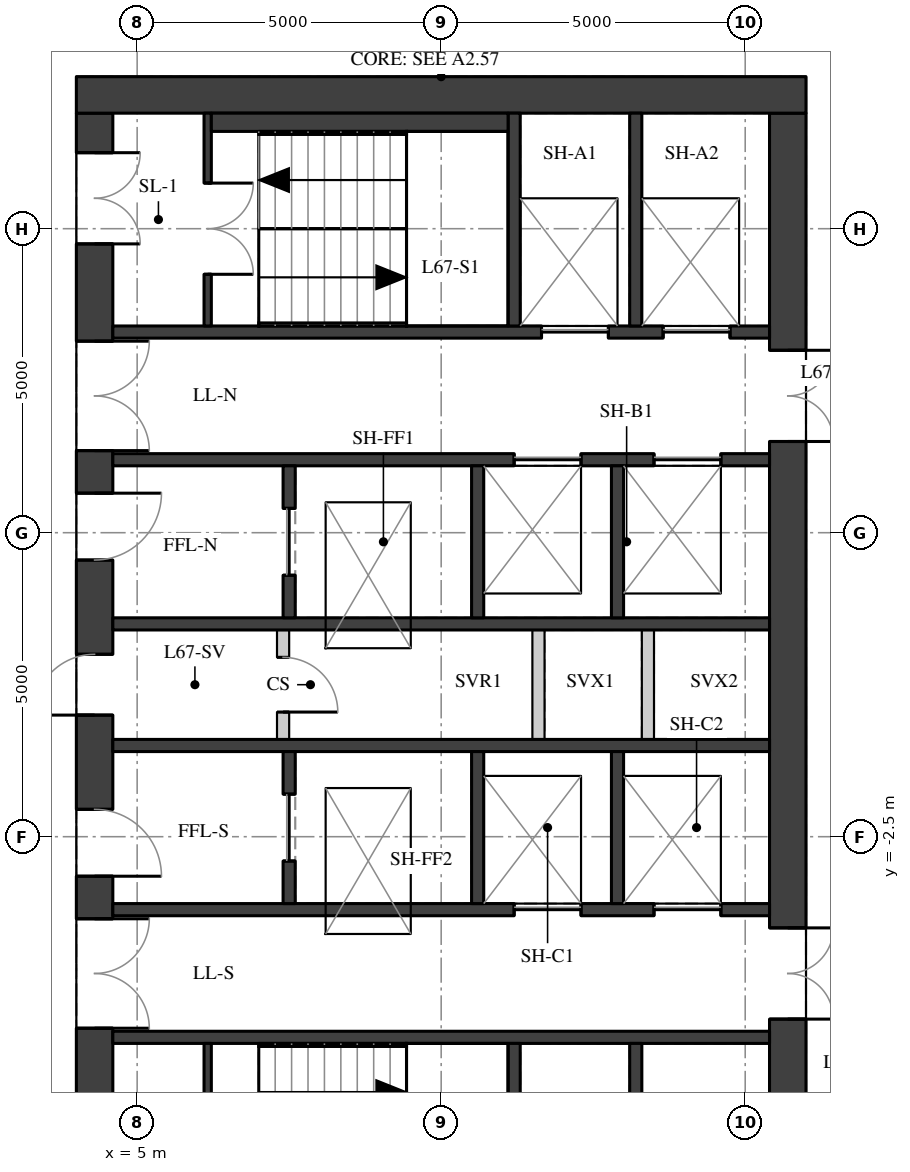
"""IFC4 building model, lengths in metres.
Left out: names, types, materials, properties, quantities, classifications, styles, units other than length and angle.
Written with IfcOpenShell. Run it as: python <this file> out.ifc"""

import sys

from ifc_helpers import new_model, si_unit, direction, frame, frame_2d, origin, place, context, subcontext, project, spatial, rectangle, extrude, element, fill, save


model = new_model("IFC4")
c1 = context("Model", 3, precision=1e-05, world=origin(), true_north=direction((0.0, 1.0)))
c2 = subcontext(c1, "Body", "Model", "MODEL_VIEW")
j1 = project(units=[si_unit("LENGTHUNIT", "METRE"), si_unit("PLANEANGLEUNIT", "RADIAN")], contexts=[c1])
p1 = place(None, origin())
s1 = spatial("IfcSite", under=j1, at=p1, CompositionType="ELEMENT")
p2 = place(p1, origin())
s2 = spatial("IfcBuilding", under=s1, at=p2, CompositionType="ELEMENT")
p3 = place(p2, frame((0.0, 0.0, 236.6)))
s3 = spatial("IfcBuildingStorey", under=s2, at=p3, CompositionType="ELEMENT", Elevation=236.6)
p4 = place(p3, frame((4.3, -9.4, 0.0), z_axis=(0.0, 0.0, 1.0), x_axis=(0.0, 1.0, 0.0)))
e1 = element("IfcWall", 1, at=p4, inside=s3, PredefinedType="SHEAR", context=c2, shape_type="SweptSolid", body=[
    extrude(rectangle(XDim=18.8, YDim=0.6, at=frame_2d((9.4, 0.0))), origin(), (0.0, 0.0, 1.0), 3.02),
])
p5 = place(p4, frame((0.65, 0.0, 0.0)))
e2 = element("IfcOpeningElement", 2, at=p5, cuts=e1, PredefinedType="OPENING", context=c2, shape_type="SweptSolid", body=[
    extrude(rectangle(XDim=1.5, YDim=2.1, at=frame_2d((0.75, 1.05))), frame((0.0, 0.31, 0.0), z_axis=(0.0, -1.0, 0.0), x_axis=(1.0, 0.0, 0.0)), (0.0, 0.0, 1.0), 0.62),
])
p6 = place(p4, frame((3.75, 0.0, 0.0)))
e3 = element("IfcOpeningElement", 3, at=p6, cuts=e1, PredefinedType="OPENING", context=c2, shape_type="SweptSolid", body=[
    extrude(rectangle(XDim=1.8, YDim=2.1, at=frame_2d((0.9, 1.05))), frame((0.0, 0.31, 0.0), z_axis=(0.0, -1.0, 0.0), x_axis=(1.0, 0.0, 0.0)), (0.0, 0.0, 1.0), 0.62),
])
p7 = place(p4, frame((6.25, 0.0, 0.0)))
e4 = element("IfcOpeningElement", 4, at=p7, cuts=e1, PredefinedType="OPENING", context=c2, shape_type="SweptSolid", body=[
    extrude(rectangle(XDim=1.1, YDim=2.1, at=frame_2d((0.55, 1.05))), frame((0.0, 0.31, 0.0), z_axis=(0.0, -1.0, 0.0), x_axis=(1.0, 0.0, 0.0)), (0.0, 0.0, 1.0), 0.62),
])
p8 = place(p4, frame((8.9, 0.0, 0.0)))
e5 = element("IfcOpeningElement", 5, at=p8, cuts=e1, PredefinedType="OPENING", context=c2, shape_type="SweptSolid", body=[
    extrude(rectangle(XDim=1.0, YDim=2.1, at=frame_2d((0.5, 1.05))), frame((0.0, 0.31, 0.0), z_axis=(0.0, -1.0, 0.0), x_axis=(1.0, 0.0, 0.0)), (0.0, 0.0, 1.0), 0.62),
])
p9 = place(p4, frame((11.45, 0.0, 0.0)))
e6 = element("IfcOpeningElement", 6, at=p9, cuts=e1, PredefinedType="OPENING", context=c2, shape_type="SweptSolid", body=[
    extrude(rectangle(XDim=1.1, YDim=2.1, at=frame_2d((0.55, 1.05))), frame((0.0, 0.31, 0.0), z_axis=(0.0, -1.0, 0.0), x_axis=(1.0, 0.0, 0.0)), (0.0, 0.0, 1.0), 0.62),
])
p10 = place(p4, frame((13.25, 0.0, 0.0)))
e7 = element("IfcOpeningElement", 7, at=p10, cuts=e1, PredefinedType="OPENING", context=c2, shape_type="SweptSolid", body=[
    extrude(rectangle(XDim=1.8, YDim=2.1, at=frame_2d((0.9, 1.05))), frame((0.0, 0.31, 0.0), z_axis=(0.0, -1.0, 0.0), x_axis=(1.0, 0.0, 0.0)), (0.0, 0.0, 1.0), 0.62),
])
p11 = place(p4, frame((16.65, 0.0, 0.0)))
e8 = element("IfcOpeningElement", 8, at=p11, cuts=e1, PredefinedType="OPENING", context=c2, shape_type="SweptSolid", body=[
    extrude(rectangle(XDim=1.5, YDim=2.1, at=frame_2d((0.75, 1.05))), frame((0.0, 0.31, 0.0), z_axis=(0.0, -1.0, 0.0), x_axis=(1.0, 0.0, 0.0)), (0.0, 0.0, 1.0), 0.62),
])
p12 = place(p3, frame((15.7, -9.4, 0.0), z_axis=(0.0, 0.0, 1.0), x_axis=(0.0, 1.0, 0.0)))
e9 = element("IfcWall", 9, at=p12, inside=s3, PredefinedType="SHEAR", context=c2, shape_type="SweptSolid", body=[
    extrude(rectangle(XDim=18.8, YDim=0.6, at=frame_2d((9.4, 0.0))), origin(), (0.0, 0.0, 1.0), 3.02),
])
p13 = place(p12, frame((13.4, 0.0, 0.0)))
e10 = element("IfcOpeningElement", 10, at=p13, cuts=e9, PredefinedType="OPENING", context=c2, shape_type="SweptSolid", body=[
    extrude(rectangle(XDim=1.5, YDim=2.1, at=frame_2d((0.75, 1.05))), frame((0.0, 0.31, 0.0), z_axis=(0.0, -1.0, 0.0), x_axis=(1.0, 0.0, 0.0)), (0.0, 0.0, 1.0), 0.62),
])
p14 = place(p12, frame((3.9, 0.0, 0.0)))
e11 = element("IfcOpeningElement", 11, at=p14, cuts=e9, PredefinedType="OPENING", context=c2, shape_type="SweptSolid", body=[
    extrude(rectangle(XDim=1.5, YDim=2.1, at=frame_2d((0.75, 1.05))), frame((0.0, 0.31, 0.0), z_axis=(0.0, -1.0, 0.0), x_axis=(1.0, 0.0, 0.0)), (0.0, 0.0, 1.0), 0.62),
])
p15 = place(p3, frame((4.0, 9.7, 0.0), z_axis=(0.0, 0.0, 1.0), x_axis=(1.0, 0.0, 0.0)))
e12 = element("IfcWall", 12, at=p15, inside=s3, PredefinedType="SHEAR", context=c2, shape_type="SweptSolid", body=[
    extrude(rectangle(XDim=12.0, YDim=0.6, at=frame_2d((6.0, 0.0))), origin(), (0.0, 0.0, 1.0), 3.02),
])
p16 = place(p3, frame((4.6, 5.8, 0.0), z_axis=(0.0, 0.0, 1.0), x_axis=(1.0, 0.0, 0.0)))
e13 = element("IfcWall", 13, at=p16, inside=s3, PredefinedType="SHEAR", context=c2, shape_type="SweptSolid", body=[
    extrude(rectangle(XDim=10.8, YDim=0.2, at=frame_2d((5.4, 0.0))), origin(), (0.0, 0.0, 1.0), 3.02),
])
p17 = place(p16, frame((7.05, 0.0, 0.0)))
e14 = element("IfcOpeningElement", 14, at=p17, cuts=e13, PredefinedType="OPENING", context=c2, shape_type="SweptSolid", body=[
    extrude(rectangle(XDim=1.1, YDim=2.1, at=frame_2d((0.55, 1.05))), frame((0.0, 0.11, 0.0), z_axis=(0.0, -1.0, 0.0), x_axis=(1.0, 0.0, 0.0)), (0.0, 0.0, 1.0), 0.22),
])
p18 = place(p16, frame((9.05, 0.0, 0.0)))
e15 = element("IfcOpeningElement", 15, at=p18, cuts=e13, PredefinedType="OPENING", context=c2, shape_type="SweptSolid", body=[
    extrude(rectangle(XDim=1.1, YDim=2.1, at=frame_2d((0.55, 1.05))), frame((0.0, 0.11, 0.0), z_axis=(0.0, -1.0, 0.0), x_axis=(1.0, 0.0, 0.0)), (0.0, 0.0, 1.0), 0.22),
])
p19 = place(p3, frame((4.6, 3.7, 0.0), z_axis=(0.0, 0.0, 1.0), x_axis=(1.0, 0.0, 0.0)))
e16 = element("IfcWall", 16, at=p19, inside=s3, PredefinedType="SHEAR", context=c2, shape_type="SweptSolid", body=[
    extrude(rectangle(XDim=10.8, YDim=0.2, at=frame_2d((5.4, 0.0))), origin(), (0.0, 0.0, 1.0), 3.02),
])
p20 = place(p19, frame((6.6, 0.0, 0.0)))
e17 = element("IfcOpeningElement", 17, at=p20, cuts=e16, PredefinedType="OPENING", context=c2, shape_type="SweptSolid", body=[
    extrude(rectangle(XDim=1.1, YDim=2.1, at=frame_2d((0.55, 1.05))), frame((0.0, 0.11, 0.0), z_axis=(0.0, -1.0, 0.0), x_axis=(1.0, 0.0, 0.0)), (0.0, 0.0, 1.0), 0.22),
])
p21 = place(p19, frame((8.9, 0.0, 0.0)))
e18 = element("IfcOpeningElement", 18, at=p21, cuts=e16, PredefinedType="OPENING", context=c2, shape_type="SweptSolid", body=[
    extrude(rectangle(XDim=1.1, YDim=2.1, at=frame_2d((0.55, 1.05))), frame((0.0, 0.11, 0.0), z_axis=(0.0, -1.0, 0.0), x_axis=(1.0, 0.0, 0.0)), (0.0, 0.0, 1.0), 0.22),
])
for number, where, z_axis, x_axis in (
    (19, (4.6, 1.0, 0.0), (0.0, 0.0, 1.0), (1.0, 0.0, 0.0)),
    (20, (4.6, -1.0, 0.0), (0.0, 0.0, 1.0), (1.0, 0.0, 0.0)),
):
    element("IfcWall", number, at=place(p3, frame(where, z_axis=z_axis, x_axis=x_axis)), inside=s3, PredefinedType="SHEAR", context=c2, shape_type="SweptSolid", body=[
        extrude(rectangle(XDim=10.8, YDim=0.2, at=frame_2d((5.4, 0.0))), origin(), (0.0, 0.0, 1.0), 3.02),
    ])
p22 = place(p3, frame((4.6, -3.7, 0.0), z_axis=(0.0, 0.0, 1.0), x_axis=(1.0, 0.0, 0.0)))
e21 = element("IfcWall", 21, at=p22, inside=s3, PredefinedType="SHEAR", context=c2, shape_type="SweptSolid", body=[
    extrude(rectangle(XDim=10.8, YDim=0.2, at=frame_2d((5.4, 0.0))), origin(), (0.0, 0.0, 1.0), 3.02),
])
p23 = place(p22, frame((6.6, 0.0, 0.0)))
e22 = element("IfcOpeningElement", 22, at=p23, cuts=e21, PredefinedType="OPENING", context=c2, shape_type="SweptSolid", body=[
    extrude(rectangle(XDim=1.1, YDim=2.1, at=frame_2d((0.55, 1.05))), frame((0.0, 0.11, 0.0), z_axis=(0.0, -1.0, 0.0), x_axis=(1.0, 0.0, 0.0)), (0.0, 0.0, 1.0), 0.22),
])
p24 = place(p22, frame((8.9, 0.0, 0.0)))
e23 = element("IfcOpeningElement", 23, at=p24, cuts=e21, PredefinedType="OPENING", context=c2, shape_type="SweptSolid", body=[
    extrude(rectangle(XDim=1.1, YDim=2.1, at=frame_2d((0.55, 1.05))), frame((0.0, 0.11, 0.0), z_axis=(0.0, -1.0, 0.0), x_axis=(1.0, 0.0, 0.0)), (0.0, 0.0, 1.0), 0.22),
])
p25 = place(p3, frame((4.6, -5.8, 0.0), z_axis=(0.0, 0.0, 1.0), x_axis=(1.0, 0.0, 0.0)))
e24 = element("IfcWall", 24, at=p25, inside=s3, PredefinedType="SHEAR", context=c2, shape_type="SweptSolid", body=[
    extrude(rectangle(XDim=10.8, YDim=0.2, at=frame_2d((5.4, 0.0))), origin(), (0.0, 0.0, 1.0), 3.02),
])
for number, where, z_axis, x_axis in (
    (25, (11.2, 5.9, 0.0), (0.0, 0.0, 1.0), (0.0, 1.0, 0.0)),
    (26, (11.2, -9.4, 0.0), (0.0, 0.0, 1.0), (0.0, 1.0, 0.0)),
    (27, (13.2, 5.9, 0.0), (0.0, 0.0, 1.0), (0.0, 1.0, 0.0)),
    (28, (13.2, -9.4, 0.0), (0.0, 0.0, 1.0), (0.0, 1.0, 0.0)),
):
    element("IfcWall", number, at=place(p3, frame(where, z_axis=z_axis, x_axis=x_axis)), inside=s3, PredefinedType="SHEAR", context=c2, shape_type="SweptSolid", body=[
        extrude(rectangle(XDim=3.5, YDim=0.2, at=frame_2d((1.75, 0.0))), origin(), (0.0, 0.0, 1.0), 3.02),
    ])
p26 = place(p3, frame((7.5, 1.1, 0.0), z_axis=(0.0, 0.0, 1.0), x_axis=(0.0, 1.0, 0.0)))
e29 = element("IfcWall", 29, at=p26, inside=s3, PredefinedType="SHEAR", context=c2, shape_type="SweptSolid", body=[
    extrude(rectangle(XDim=2.5, YDim=0.2, at=frame_2d((1.25, 0.0))), origin(), (0.0, 0.0, 1.0), 3.02),
])
p27 = place(p26, frame((0.7, 0.0, 0.0)))
e30 = element("IfcOpeningElement", 30, at=p27, cuts=e29, PredefinedType="OPENING", context=c2, shape_type="SweptSolid", body=[
    extrude(rectangle(XDim=1.1, YDim=2.1, at=frame_2d((0.55, 1.05))), frame((0.0, 0.11, 0.0), z_axis=(0.0, -1.0, 0.0), x_axis=(1.0, 0.0, 0.0)), (0.0, 0.0, 1.0), 0.22),
])
p28 = place(p3, frame((7.5, -3.6, 0.0), z_axis=(0.0, 0.0, 1.0), x_axis=(0.0, 1.0, 0.0)))
e31 = element("IfcWall", 31, at=p28, inside=s3, PredefinedType="SHEAR", context=c2, shape_type="SweptSolid", body=[
    extrude(rectangle(XDim=2.5, YDim=0.2, at=frame_2d((1.25, 0.0))), origin(), (0.0, 0.0, 1.0), 3.02),
])
p29 = place(p28, frame((0.7, 0.0, 0.0)))
e32 = element("IfcOpeningElement", 32, at=p29, cuts=e31, PredefinedType="OPENING", context=c2, shape_type="SweptSolid", body=[
    extrude(rectangle(XDim=1.1, YDim=2.1, at=frame_2d((0.55, 1.05))), frame((0.0, 0.11, 0.0), z_axis=(0.0, -1.0, 0.0), x_axis=(1.0, 0.0, 0.0)), (0.0, 0.0, 1.0), 0.22),
])
for number, where, z_axis, x_axis in (
    (33, (10.6, 1.1, 0.0), (0.0, 0.0, 1.0), (0.0, 1.0, 0.0)),
    (34, (10.6, -3.6, 0.0), (0.0, 0.0, 1.0), (0.0, 1.0, 0.0)),
    (35, (12.9, 1.1, 0.0), (0.0, 0.0, 1.0), (0.0, 1.0, 0.0)),
    (36, (12.9, -3.6, 0.0), (0.0, 0.0, 1.0), (0.0, 1.0, 0.0)),
):
    element("IfcWall", number, at=place(p3, frame(where, z_axis=z_axis, x_axis=x_axis)), inside=s3, PredefinedType="SHEAR", context=c2, shape_type="SweptSolid", body=[
        extrude(rectangle(XDim=2.5, YDim=0.2, at=frame_2d((1.25, 0.0))), origin(), (0.0, 0.0, 1.0), 3.02),
    ])
p30 = place(p3, frame((6.16, 5.9, 0.0), z_axis=(0.0, 0.0, 1.0), x_axis=(0.0, 1.0, 0.0)))
e37 = element("IfcWall", 37, at=p30, inside=s3, PredefinedType="SHEAR", context=c2, shape_type="SweptSolid", body=[
    extrude(rectangle(XDim=3.5, YDim=0.12, at=frame_2d((1.75, 0.0))), origin(), (0.0, 0.0, 1.0), 3.02),
])
p31 = place(p30, frame((0.85, 0.0, 0.0)))
e38 = element("IfcOpeningElement", 38, at=p31, cuts=e37, PredefinedType="OPENING", context=c2, shape_type="SweptSolid", body=[
    extrude(rectangle(XDim=1.5, YDim=2.1, at=frame_2d((0.75, 1.05))), frame((0.0, 0.07, 0.0), z_axis=(0.0, -1.0, 0.0), x_axis=(1.0, 0.0, 0.0)), (0.0, 0.0, 1.0), 0.14),
])
p32 = place(p3, frame((6.16, -9.4, 0.0), z_axis=(0.0, 0.0, 1.0), x_axis=(0.0, 1.0, 0.0)))
e39 = element("IfcWall", 39, at=p32, inside=s3, PredefinedType="SHEAR", context=c2, shape_type="SweptSolid", body=[
    extrude(rectangle(XDim=3.5, YDim=0.12, at=frame_2d((1.75, 0.0))), origin(), (0.0, 0.0, 1.0), 3.02),
])
p33 = place(p32, frame((1.15, 0.0, 0.0)))
e40 = element("IfcOpeningElement", 40, at=p33, cuts=e39, PredefinedType="OPENING", context=c2, shape_type="SweptSolid", body=[
    extrude(rectangle(XDim=1.5, YDim=2.1, at=frame_2d((0.75, 1.05))), frame((0.0, 0.07, 0.0), z_axis=(0.0, -1.0, 0.0), x_axis=(1.0, 0.0, 0.0)), (0.0, 0.0, 1.0), 0.14),
])
p34 = place(p3, frame((7.4, -0.9, 0.0), z_axis=(0.0, 0.0, 1.0), x_axis=(0.0, 1.0, 0.0)))
e41 = element("IfcWall", 41, at=p34, inside=s3, PredefinedType="PARTITIONING", context=c2, shape_type="SweptSolid", body=[
    extrude(rectangle(XDim=1.8, YDim=0.2, at=frame_2d((0.9, 0.0))), origin(), (0.0, 0.0, 1.0), 3.02),
])
p35 = place(p34, frame((0.45, 0.0, 0.0)))
e42 = element("IfcOpeningElement", 42, at=p35, cuts=e41, PredefinedType="OPENING", context=c2, shape_type="SweptSolid", body=[
    extrude(rectangle(XDim=0.9, YDim=2.1, at=frame_2d((0.45, 1.05))), frame((0.0, 0.11, 0.0), z_axis=(0.0, -1.0, 0.0), x_axis=(1.0, 0.0, 0.0)), (0.0, 0.0, 1.0), 0.22),
])
for number, where, z_axis, x_axis in (
    (43, (11.6, -0.9, 0.0), (0.0, 0.0, 1.0), (0.0, 1.0, 0.0)),
    (44, (13.4, -0.9, 0.0), (0.0, 0.0, 1.0), (0.0, 1.0, 0.0)),
):
    element("IfcWall", number, at=place(p3, frame(where, z_axis=z_axis, x_axis=x_axis)), inside=s3, PredefinedType="PARTITIONING", context=c2, shape_type="SweptSolid", body=[
        extrude(rectangle(XDim=1.8, YDim=0.2, at=frame_2d((0.9, 0.0))), origin(), (0.0, 0.0, 1.0), 3.02),
    ])
p36 = place(p3, frame((6.22, 9.25, 0.0), z_axis=(0.0, 0.0, 1.0), x_axis=(1.0, 0.0, 0.0)))
e45 = element("IfcWall", 45, at=p36, inside=s3, PredefinedType="PARTITIONING", context=c2, shape_type="SweptSolid", body=[
    extrude(rectangle(XDim=4.88, YDim=0.3, at=frame_2d((2.44, 0.0))), origin(), (0.0, 0.0, 1.0), 3.02),
])
p37 = place(p6, origin())
e46 = element("IfcDoor", 46, at=p37, inside=s3, OperationType="DOUBLE_DOOR_SINGLE_SWING", PredefinedType="DOOR", context=c2, shape_type="SweptSolid", body=[
    extrude(rectangle(XDim=1.8, YDim=2.1, at=frame_2d((0.9, 1.05))), frame((0.0, 0.025, 0.0), z_axis=(0.0, -1.0, 0.0), x_axis=(1.0, 0.0, 0.0)), (0.0, 0.0, 1.0), 0.05),
])
fill(e3, e46)
p38 = place(p7, origin())
e47 = element("IfcDoor", 47, at=p38, inside=s3, OperationType="SINGLE_SWING_RIGHT", PredefinedType="DOOR", context=c2, shape_type="SweptSolid", body=[
    extrude(rectangle(XDim=1.1, YDim=2.1, at=frame_2d((0.55, 1.05))), frame((0.0, 0.025, 0.0), z_axis=(0.0, -1.0, 0.0), x_axis=(1.0, 0.0, 0.0)), (0.0, 0.0, 1.0), 0.05),
])
fill(e4, e47)
p39 = place(p8, origin())
e48 = element("IfcDoor", 48, at=p39, inside=s3, OperationType="SINGLE_SWING_LEFT", PredefinedType="DOOR", context=c2, shape_type="SweptSolid", body=[
    extrude(rectangle(XDim=1.0, YDim=2.1, at=frame_2d((0.5, 1.05))), frame((0.0, 0.025, 0.0), z_axis=(0.0, -1.0, 0.0), x_axis=(1.0, 0.0, 0.0)), (0.0, 0.0, 1.0), 0.05),
])
fill(e5, e48)
p40 = place(p9, origin())
e49 = element("IfcDoor", 49, at=p40, inside=s3, OperationType="SINGLE_SWING_LEFT", PredefinedType="DOOR", context=c2, shape_type="SweptSolid", body=[
    extrude(rectangle(XDim=1.1, YDim=2.1, at=frame_2d((0.55, 1.05))), frame((0.0, 0.025, 0.0), z_axis=(0.0, -1.0, 0.0), x_axis=(1.0, 0.0, 0.0)), (0.0, 0.0, 1.0), 0.05),
])
fill(e6, e49)
p41 = place(p10, origin())
e50 = element("IfcDoor", 50, at=p41, inside=s3, OperationType="DOUBLE_DOOR_SINGLE_SWING", PredefinedType="DOOR", context=c2, shape_type="SweptSolid", body=[
    extrude(rectangle(XDim=1.8, YDim=2.1, at=frame_2d((0.9, 1.05))), frame((0.0, 0.025, 0.0), z_axis=(0.0, -1.0, 0.0), x_axis=(1.0, 0.0, 0.0)), (0.0, 0.0, 1.0), 0.05),
])
fill(e7, e50)
p42 = place(p11, origin())
e51 = element("IfcDoor", 51, at=p42, inside=s3, OperationType="DOUBLE_DOOR_SINGLE_SWING", PredefinedType="DOOR", context=c2, shape_type="SweptSolid", body=[
    extrude(rectangle(XDim=1.5, YDim=2.1, at=frame_2d((0.75, 1.05))), frame((0.0, 0.025, 0.0), z_axis=(0.0, -1.0, 0.0), x_axis=(1.0, 0.0, 0.0)), (0.0, 0.0, 1.0), 0.05),
])
fill(e8, e51)
p43 = place(p13, origin())
e52 = element("IfcDoor", 52, at=p43, inside=s3, OperationType="DOUBLE_DOOR_SINGLE_SWING", PredefinedType="DOOR", context=c2, shape_type="SweptSolid", body=[
    extrude(rectangle(XDim=1.5, YDim=2.1, at=frame_2d((0.75, 1.05))), frame((0.0, 0.025, 0.0), z_axis=(0.0, -1.0, 0.0), x_axis=(1.0, 0.0, 0.0)), (0.0, 0.0, 1.0), 0.05),
])
fill(e10, e52)
p44 = place(p14, origin())
e53 = element("IfcDoor", 53, at=p44, inside=s3, OperationType="DOUBLE_DOOR_SINGLE_SWING", PredefinedType="DOOR", context=c2, shape_type="SweptSolid", body=[
    extrude(rectangle(XDim=1.5, YDim=2.1, at=frame_2d((0.75, 1.05))), frame((0.0, 0.025, 0.0), z_axis=(0.0, -1.0, 0.0), x_axis=(1.0, 0.0, 0.0)), (0.0, 0.0, 1.0), 0.05),
])
fill(e11, e53)
p45 = place(p31, origin())
e54 = element("IfcDoor", 54, at=p45, inside=s3, OperationType="DOUBLE_DOOR_SINGLE_SWING", PredefinedType="DOOR", context=c2, shape_type="SweptSolid", body=[
    extrude(rectangle(XDim=1.5, YDim=2.1, at=frame_2d((0.75, 1.05))), frame((0.0, 0.025, 0.0), z_axis=(0.0, -1.0, 0.0), x_axis=(1.0, 0.0, 0.0)), (0.0, 0.0, 1.0), 0.05),
])
fill(e38, e54)
p46 = place(p17, origin())
e55 = element("IfcDoor", 55, at=p46, inside=s3, OperationType="DOUBLE_DOOR_SLIDING", PredefinedType="DOOR", context=c2, shape_type="SweptSolid", body=[
    extrude(rectangle(XDim=1.1, YDim=2.1, at=frame_2d((0.55, 1.05))), frame((0.0, 0.025, 0.0), z_axis=(0.0, -1.0, 0.0), x_axis=(1.0, 0.0, 0.0)), (0.0, 0.0, 1.0), 0.05),
])
fill(e14, e55)
p47 = place(p18, origin())
e56 = element("IfcDoor", 56, at=p47, inside=s3, OperationType="DOUBLE_DOOR_SLIDING", PredefinedType="DOOR", context=c2, shape_type="SweptSolid", body=[
    extrude(rectangle(XDim=1.1, YDim=2.1, at=frame_2d((0.55, 1.05))), frame((0.0, 0.025, 0.0), z_axis=(0.0, -1.0, 0.0), x_axis=(1.0, 0.0, 0.0)), (0.0, 0.0, 1.0), 0.05),
])
fill(e15, e56)
p48 = place(p20, origin())
e57 = element("IfcDoor", 57, at=p48, inside=s3, OperationType="DOUBLE_DOOR_SLIDING", PredefinedType="DOOR", context=c2, shape_type="SweptSolid", body=[
    extrude(rectangle(XDim=1.1, YDim=2.1, at=frame_2d((0.55, 1.05))), frame((0.0, 0.025, 0.0), z_axis=(0.0, -1.0, 0.0), x_axis=(1.0, 0.0, 0.0)), (0.0, 0.0, 1.0), 0.05),
])
fill(e17, e57)
p49 = place(p21, origin())
e58 = element("IfcDoor", 58, at=p49, inside=s3, OperationType="DOUBLE_DOOR_SLIDING", PredefinedType="DOOR", context=c2, shape_type="SweptSolid", body=[
    extrude(rectangle(XDim=1.1, YDim=2.1, at=frame_2d((0.55, 1.05))), frame((0.0, 0.025, 0.0), z_axis=(0.0, -1.0, 0.0), x_axis=(1.0, 0.0, 0.0)), (0.0, 0.0, 1.0), 0.05),
])
fill(e18, e58)
p50 = place(p23, origin())
e59 = element("IfcDoor", 59, at=p50, inside=s3, OperationType="DOUBLE_DOOR_SLIDING", PredefinedType="DOOR", context=c2, shape_type="SweptSolid", body=[
    extrude(rectangle(XDim=1.1, YDim=2.1, at=frame_2d((0.55, 1.05))), frame((0.0, 0.025, 0.0), z_axis=(0.0, -1.0, 0.0), x_axis=(1.0, 0.0, 0.0)), (0.0, 0.0, 1.0), 0.05),
])
fill(e22, e59)
p51 = place(p24, origin())
e60 = element("IfcDoor", 60, at=p51, inside=s3, OperationType="DOUBLE_DOOR_SLIDING", PredefinedType="DOOR", context=c2, shape_type="SweptSolid", body=[
    extrude(rectangle(XDim=1.1, YDim=2.1, at=frame_2d((0.55, 1.05))), frame((0.0, 0.025, 0.0), z_axis=(0.0, -1.0, 0.0), x_axis=(1.0, 0.0, 0.0)), (0.0, 0.0, 1.0), 0.05),
])
fill(e23, e60)
p52 = place(p27, origin())
e61 = element("IfcDoor", 61, at=p52, inside=s3, OperationType="DOUBLE_DOOR_SLIDING", PredefinedType="DOOR", context=c2, shape_type="SweptSolid", body=[
    extrude(rectangle(XDim=1.1, YDim=2.1, at=frame_2d((0.55, 1.05))), frame((0.0, 0.025, 0.0), z_axis=(0.0, -1.0, 0.0), x_axis=(1.0, 0.0, 0.0)), (0.0, 0.0, 1.0), 0.05),
])
fill(e30, e61)
p53 = place(p29, origin())
e62 = element("IfcDoor", 62, at=p53, inside=s3, OperationType="DOUBLE_DOOR_SLIDING", PredefinedType="DOOR", context=c2, shape_type="SweptSolid", body=[
    extrude(rectangle(XDim=1.1, YDim=2.1, at=frame_2d((0.55, 1.05))), frame((0.0, 0.025, 0.0), z_axis=(0.0, -1.0, 0.0), x_axis=(1.0, 0.0, 0.0)), (0.0, 0.0, 1.0), 0.05),
])
fill(e32, e62)
p54 = place(p35, origin())
e63 = element("IfcDoor", 63, at=p54, inside=s3, OperationType="SINGLE_SWING_RIGHT", PredefinedType="DOOR", context=c2, shape_type="SweptSolid", body=[
    extrude(rectangle(XDim=0.9, YDim=2.1, at=frame_2d((0.45, 1.05))), frame((0.0, 0.025, 0.0), z_axis=(0.0, -1.0, 0.0), x_axis=(1.0, 0.0, 0.0)), (0.0, 0.0, 1.0), 0.05),
])
fill(e42, e63)
save(model, sys.argv[1])
